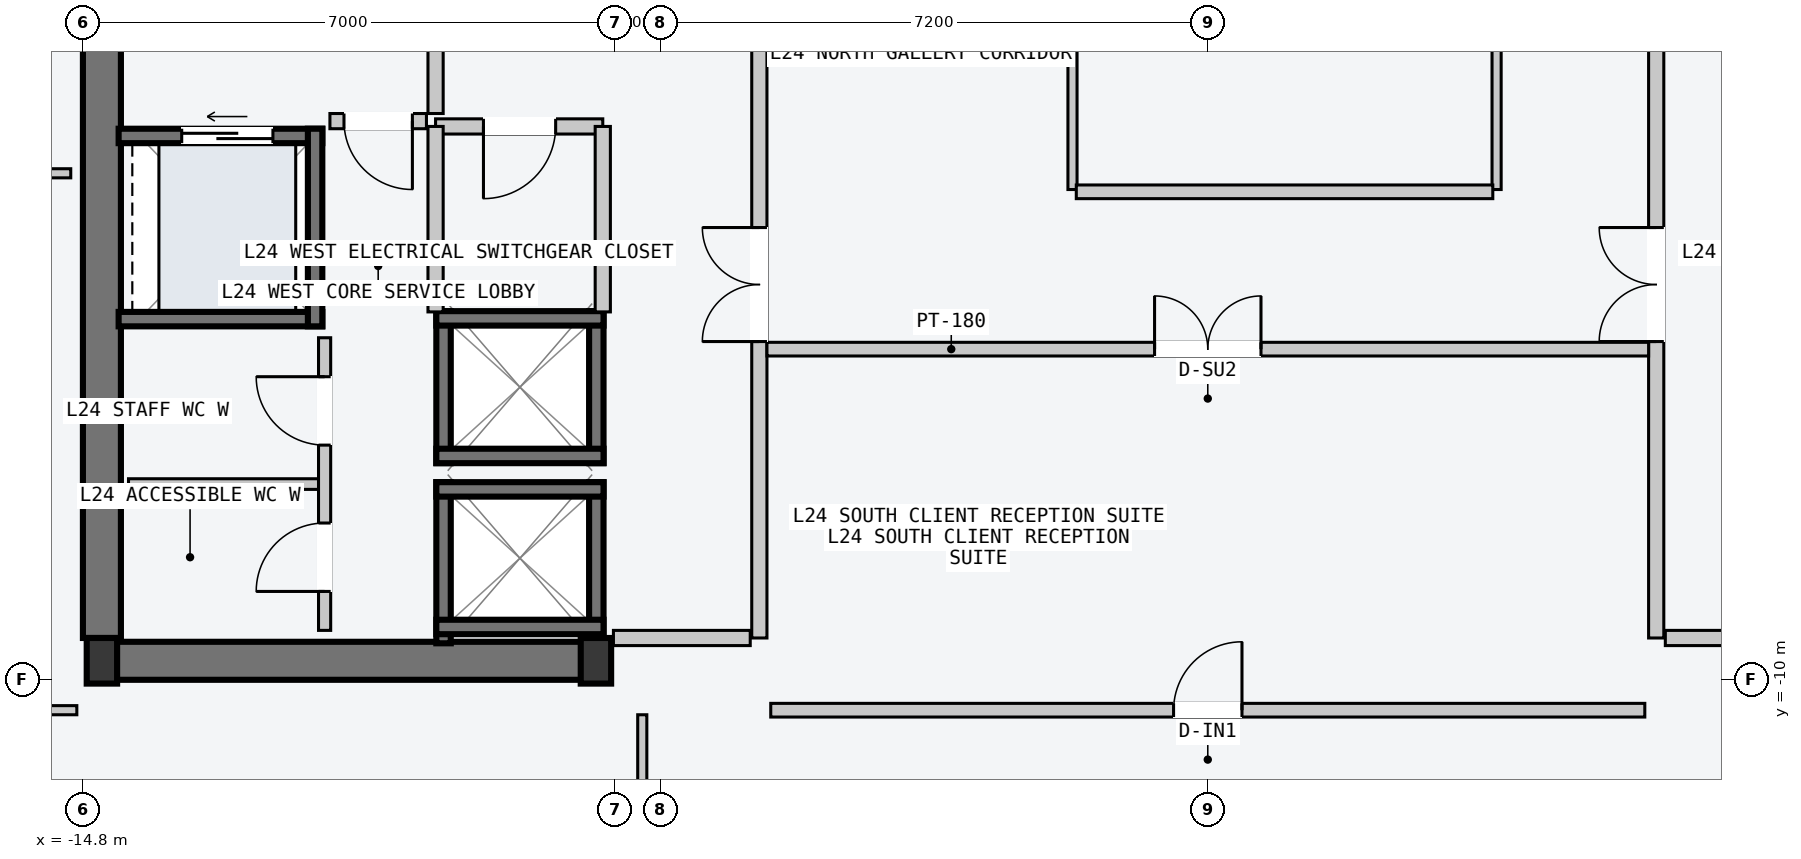
"""IFC4 building model, lengths in metres.
Left out: names, types, materials, properties, quantities, classifications, styles, units other than length and angle.
Written with IfcOpenShell. Run it as: python <this file> out.ifc"""

import sys

from ifc_helpers import new_model, si_unit, direction, frame, frame_2d, origin, origin_2d, place, context, subcontext, project, spatial, rectangle, i_section, extrude, element, fill, save


model = new_model("IFC4")
c1 = context("Model", 3, precision=1e-05, world=origin(), true_north=direction((0.0, 1.0)))
c2 = subcontext(c1, "Body", "Model", "MODEL_VIEW")
j1 = project(units=[si_unit("LENGTHUNIT", "METRE"), si_unit("PLANEANGLEUNIT", "RADIAN")], contexts=[c1])
p1 = place(None, origin())
s1 = spatial("IfcSite", under=j1, at=p1, CompositionType="ELEMENT")
p2 = place(p1, origin())
s2 = spatial("IfcBuilding", under=s1, at=p2, CompositionType="ELEMENT")
p3 = place(p2, frame((0.0, 0.0, 95.4)))
s3 = spatial("IfcBuildingStorey", under=s2, at=p3, CompositionType="ELEMENT", Elevation=95.4)
p4 = place(p3, frame((-14.53, -9.75, -0.2), z_axis=(0.0, 0.0, 1.0), x_axis=(1.0, 0.0, 0.0)))
e1 = element("IfcWall", 1, at=p4, inside=s3, PredefinedType="SHEAR", context=c2, shape_type="SweptSolid", body=[
    extrude(rectangle(XDim=6.46, YDim=0.5, at=frame_2d((3.23, 0.0))), origin(), (0.0, 0.0, 1.0), 3.6),
])
p5 = place(p3, frame((-14.55, -9.45, -0.2), z_axis=(0.0, 0.0, 1.0), x_axis=(0.0, 1.0, 0.0)))
e2 = element("IfcWall", 2, at=p5, inside=s3, PredefinedType="SHEAR", context=c2, shape_type="SweptSolid", body=[
    extrude(rectangle(XDim=9.15, YDim=0.5, at=frame_2d((4.575, 0.0))), origin(), (0.0, 0.0, 1.0), 3.6),
])
for number, where, z_axis, x_axis in (
    (3, (-14.55, -9.75, 0.0), (0.0, 0.0, 1.0), (1.0, 0.0, 0.0)),
    (4, (-8.05, -9.75, 0.0), (0.0, 0.0, 1.0), (1.0, 0.0, 0.0)),
):
    element("IfcColumn", number, at=place(p3, frame(where, z_axis=z_axis, x_axis=x_axis)), inside=s3, PredefinedType="COLUMN", context=c2, shape_type="SweptSolid", body=[
        extrude(i_section(OverallWidth=0.4, OverallDepth=0.6, WebThickness=0.022, FlangeThickness=0.036, at=origin_2d()), origin(), (0.0, 0.0, 1.0), 3.6),
    ])
for number, where, z_axis, x_axis in (
    (5, (-8.045, -9.52, -0.2), (0.0, 0.0, 1.0), (0.0, 1.0, 0.0)),
    (6, (-10.055, -9.52, -0.2), (0.0, 0.0, 1.0), (0.0, 1.0, 0.0)),
):
    element("IfcWall", number, at=place(p3, frame(where, z_axis=z_axis, x_axis=x_axis)), inside=s3, PredefinedType="SOLIDWALL", context=c2, shape_type="SweptSolid", body=[
        extrude(rectangle(XDim=2.12, YDim=0.19, at=frame_2d((1.06, 0.0))), origin(), (0.0, 0.0, 1.0), 3.6),
    ])
for number, where, z_axis, x_axis in (
    (7, (-10.15, -7.495, -0.2), (0.0, 0.0, 1.0), (1.0, 0.0, 0.0)),
    (8, (-10.15, -9.305, -0.2), (0.0, 0.0, 1.0), (1.0, 0.0, 0.0)),
):
    element("IfcWall", number, at=place(p3, frame(where, z_axis=z_axis, x_axis=x_axis)), inside=s3, PredefinedType="SOLIDWALL", context=c2, shape_type="SweptSolid", body=[
        extrude(rectangle(XDim=2.2, YDim=0.19, at=frame_2d((1.1, 0.0))), origin(), (0.0, 0.0, 1.0), 3.6),
    ])
for number, where, z_axis, x_axis in (
    (9, (-8.045, -7.15, -0.2), (0.0, 0.0, 1.0), (0.0, 1.0, 0.0)),
    (10, (-10.055, -7.15, -0.2), (0.0, 0.0, 1.0), (0.0, 1.0, 0.0)),
):
    element("IfcWall", number, at=place(p3, frame(where, z_axis=z_axis, x_axis=x_axis)), inside=s3, PredefinedType="SOLIDWALL", context=c2, shape_type="SweptSolid", body=[
        extrude(rectangle(XDim=2.0, YDim=0.19, at=frame_2d((1.0, 0.0))), origin(), (0.0, 0.0, 1.0), 3.6),
    ])
for number, where, z_axis, x_axis in (
    (11, (-10.15, -5.245, -0.2), (0.0, 0.0, 1.0), (1.0, 0.0, 0.0)),
    (12, (-10.15, -7.055, -0.2), (0.0, 0.0, 1.0), (1.0, 0.0, 0.0)),
):
    element("IfcWall", number, at=place(p3, frame(where, z_axis=z_axis, x_axis=x_axis)), inside=s3, PredefinedType="SOLIDWALL", context=c2, shape_type="SweptSolid", body=[
        extrude(rectangle(XDim=2.2, YDim=0.19, at=frame_2d((1.1, 0.0))), origin(), (0.0, 0.0, 1.0), 3.6),
    ])
p6 = place(p3, frame((-14.33, -2.845, -0.2), z_axis=(0.0, 0.0, 1.0), x_axis=(1.0, 0.0, 0.0)))
e13 = element("IfcWall", 13, at=p6, inside=s3, PredefinedType="SOLIDWALL", context=c2, shape_type="SweptSolid", body=[
    extrude(rectangle(XDim=2.68, YDim=0.19, at=frame_2d((1.34, 0.0))), origin(), (0.0, 0.0, 1.0), 3.6),
])
p7 = place(p6, frame((0.83, 0.0, 0.2)))
e14 = element("IfcOpeningElement", 14, at=p7, cuts=e13, PredefinedType="OPENING", context=c2, shape_type="SweptSolid", body=[
    extrude(rectangle(XDim=1.2, YDim=2.2, at=frame_2d((0.6, 1.1))), frame((0.0, 0.105, 0.0), z_axis=(0.0, -1.0, 0.0), x_axis=(1.0, 0.0, 0.0)), (0.0, 0.0, 1.0), 0.21),
])
p8 = place(p3, frame((-14.33, -5.255, -0.2), z_axis=(0.0, 0.0, 1.0), x_axis=(1.0, 0.0, 0.0)))
e15 = element("IfcWall", 15, at=p8, inside=s3, PredefinedType="SOLIDWALL", context=c2, shape_type="SweptSolid", body=[
    extrude(rectangle(XDim=2.68, YDim=0.19, at=frame_2d((1.34, 0.0))), origin(), (0.0, 0.0, 1.0), 3.6),
])
p9 = place(p3, frame((-11.745, -5.35, -0.2), z_axis=(0.0, 0.0, 1.0), x_axis=(0.0, 1.0, 0.0)))
e16 = element("IfcWall", 16, at=p9, inside=s3, PredefinedType="SOLIDWALL", context=c2, shape_type="SweptSolid", body=[
    extrude(rectangle(XDim=2.6, YDim=0.19, at=frame_2d((1.3, 0.0))), origin(), (0.0, 0.0, 1.0), 3.6),
])
p10 = place(p3, frame((-5.9, -9.45, 0.0), z_axis=(0.0, 0.0, 1.0), x_axis=(0.0, 1.0, 0.0)))
e17 = element("IfcWall", 17, at=p10, inside=s3, PredefinedType="PARTITIONING", context=c2, shape_type="SweptSolid", body=[
    extrude(rectangle(XDim=10.5, YDim=0.2, at=frame_2d((5.25, 0.0))), origin(), (0.0, 0.0, 1.0), 3.4),
])
p11 = place(p10, frame((3.9, 0.0, 0.0)))
e18 = element("IfcOpeningElement", 18, at=p11, cuts=e17, PredefinedType="OPENING", context=c2, shape_type="SweptSolid", body=[
    extrude(rectangle(XDim=1.5, YDim=2.2, at=frame_2d((0.75, 1.1))), frame((0.0, 0.11, 0.0), z_axis=(0.0, -1.0, 0.0), x_axis=(1.0, 0.0, 0.0)), (0.0, 0.0, 1.0), 0.22),
])
p12 = place(p3, frame((-6.02, -9.45, 0.0), z_axis=(0.0, 0.0, 1.0), x_axis=(-1.0, 0.0, 0.0)))
e19 = element("IfcWall", 19, at=p12, inside=s3, PredefinedType="PARTITIONING", context=c2, shape_type="SweptSolid", body=[
    extrude(rectangle(XDim=1.8, YDim=0.2, at=frame_2d((0.9, 0.0))), origin(), (0.0, 0.0, 1.0), 3.4),
])
p13 = place(p3, frame((-10.16, -2.55, 0.0), z_axis=(0.0, 0.0, 1.0), x_axis=(0.0, 1.0, 0.0)))
e20 = element("IfcWall", 20, at=p13, inside=s3, PredefinedType="PARTITIONING", context=c2, shape_type="SweptSolid", body=[
    extrude(rectangle(XDim=3.8, YDim=0.2, at=frame_2d((1.9, 0.0))), origin(), (0.0, 0.0, 1.0), 3.4),
])
p14 = place(p13, frame((1.3, 0.0, 0.0)))
e21 = element("IfcOpeningElement", 21, at=p14, cuts=e20, PredefinedType="OPENING", context=c2, shape_type="SweptSolid", body=[
    extrude(rectangle(XDim=1.1, YDim=2.15, at=frame_2d((0.55, 1.075))), frame((0.0, 0.11, 0.0), z_axis=(0.0, -1.0, 0.0), x_axis=(1.0, 0.0, 0.0)), (0.0, 0.0, 1.0), 0.22),
])
p15 = place(p3, frame((-10.28, -2.65, 0.0), z_axis=(0.0, 0.0, 1.0), x_axis=(-1.0, 0.0, 0.0)))
e22 = element("IfcWall", 22, at=p15, inside=s3, PredefinedType="PARTITIONING", context=c2, shape_type="SweptSolid", body=[
    extrude(rectangle(XDim=1.27, YDim=0.2, at=frame_2d((0.635, 0.0))), origin(), (0.0, 0.0, 1.0), 3.4),
])
p16 = place(p15, frame((0.185, 0.0, 0.0)))
e23 = element("IfcOpeningElement", 23, at=p16, cuts=e22, PredefinedType="OPENING", context=c2, shape_type="SweptSolid", body=[
    extrude(rectangle(XDim=0.9, YDim=2.15, at=frame_2d((0.45, 1.075))), frame((0.0, 0.11, 0.0), z_axis=(0.0, -1.0, 0.0), x_axis=(1.0, 0.0, 0.0)), (0.0, 0.0, 1.0), 0.22),
])
p17 = place(p3, frame((-7.96, -2.72, 0.0), z_axis=(0.0, 0.0, 1.0), x_axis=(-1.0, 0.0, 0.0)))
e24 = element("IfcWall", 24, at=p17, inside=s3, PredefinedType="PARTITIONING", context=c2, shape_type="SweptSolid", body=[
    extrude(rectangle(XDim=2.2, YDim=0.2, at=frame_2d((1.1, 0.0))), origin(), (0.0, 0.0, 1.0), 3.4),
])
p18 = place(p17, frame((0.62, 0.0, 0.0)))
e25 = element("IfcOpeningElement", 25, at=p18, cuts=e24, PredefinedType="OPENING", context=c2, shape_type="SweptSolid", body=[
    extrude(rectangle(XDim=0.95, YDim=2.1, at=frame_2d((0.475, 1.05))), frame((0.0, 0.11, 0.0), z_axis=(0.0, -1.0, 0.0), x_axis=(1.0, 0.0, 0.0)), (0.0, 0.0, 1.0), 0.22),
])
for number, where, z_axis, x_axis in (
    (26, (-7.96, -5.16, 0.0), (0.0, 0.0, 1.0), (0.0, 1.0, 0.0)),
    (27, (-10.16, -5.16, 0.0), (0.0, 0.0, 1.0), (0.0, 1.0, 0.0)),
):
    element("IfcWall", number, at=place(p3, frame(where, z_axis=z_axis, x_axis=x_axis)), inside=s3, PredefinedType="PARTITIONING", context=c2, shape_type="SweptSolid", body=[
        extrude(rectangle(XDim=2.44, YDim=0.2, at=frame_2d((1.22, 0.0))), origin(), (0.0, 0.0, 1.0), 3.4),
    ])
p19 = place(p3, frame((-11.7, -7.425, 0.0), z_axis=(0.0, 0.0, 1.0), x_axis=(-1.0, 0.0, 0.0)))
e28 = element("IfcWall", 28, at=p19, inside=s3, PredefinedType="PARTITIONING", context=c2, shape_type="SweptSolid", body=[
    extrude(rectangle(XDim=2.5, YDim=0.14, at=frame_2d((1.25, 0.0))), origin(), (0.0, 0.0, 1.0), 3.4),
])
p20 = place(p3, frame((-11.62, -9.35, 0.0), z_axis=(0.0, 0.0, 1.0), x_axis=(0.0, 1.0, 0.0)))
e29 = element("IfcWall", 29, at=p20, inside=s3, PredefinedType="PARTITIONING", context=c2, shape_type="SweptSolid", body=[
    extrude(rectangle(XDim=3.85, YDim=0.16, at=frame_2d((1.925, 0.0))), origin(), (0.0, 0.0, 1.0), 3.4),
])
p21 = place(p20, frame((0.512, 0.0, 0.0)))
e30 = element("IfcOpeningElement", 30, at=p21, cuts=e29, PredefinedType="OPENING", context=c2, shape_type="SweptSolid", body=[
    extrude(rectangle(XDim=0.9, YDim=2.15, at=frame_2d((0.45, 1.075))), frame((0.0, 0.09, 0.0), z_axis=(0.0, -1.0, 0.0), x_axis=(1.0, 0.0, 0.0)), (0.0, 0.0, 1.0), 0.18),
])
p22 = place(p20, frame((2.438, 0.0, 0.0)))
e31 = element("IfcOpeningElement", 31, at=p22, cuts=e29, PredefinedType="OPENING", context=c2, shape_type="SweptSolid", body=[
    extrude(rectangle(XDim=0.9, YDim=2.15, at=frame_2d((0.45, 1.075))), frame((0.0, 0.09, 0.0), z_axis=(0.0, -1.0, 0.0), x_axis=(1.0, 0.0, 0.0)), (0.0, 0.0, 1.0), 0.18),
])
p23 = place(p3, frame((5.9, -9.45, 0.0), z_axis=(0.0, 0.0, 1.0), x_axis=(0.0, 1.0, 0.0)))
e32 = element("IfcWall", 32, at=p23, inside=s3, PredefinedType="PARTITIONING", context=c2, shape_type="SweptSolid", body=[
    extrude(rectangle(XDim=18.9, YDim=0.2, at=frame_2d((9.45, 0.0))), origin(), (0.0, 0.0, 1.0), 3.4),
])
p24 = place(p23, frame((3.9, 0.0, 0.0)))
e33 = element("IfcOpeningElement", 33, at=p24, cuts=e32, PredefinedType="OPENING", context=c2, shape_type="SweptSolid", body=[
    extrude(rectangle(XDim=1.5, YDim=2.2, at=frame_2d((0.75, 1.1))), frame((0.0, 0.11, 0.0), z_axis=(0.0, -1.0, 0.0), x_axis=(1.0, 0.0, 0.0)), (0.0, 0.0, 1.0), 0.22),
])
p25 = place(p3, frame((6.02, -9.45, 0.0), z_axis=(0.0, 0.0, 1.0), x_axis=(1.0, 0.0, 0.0)))
e34 = element("IfcWall", 34, at=p25, inside=s3, PredefinedType="PARTITIONING", context=c2, shape_type="SweptSolid", body=[
    extrude(rectangle(XDim=1.8, YDim=0.2, at=frame_2d((0.9, 0.0))), origin(), (0.0, 0.0, 1.0), 3.4),
])
for number, where, z_axis, x_axis in (
    (35, (-1.78, -3.55, 0.0), (0.0, 0.0, 1.0), (0.0, 1.0, 0.0)),
    (36, (3.8, -3.55, 0.0), (0.0, 0.0, 1.0), (0.0, 1.0, 0.0)),
):
    element("IfcWall", number, at=place(p3, frame(where, z_axis=z_axis, x_axis=x_axis)), inside=s3, PredefinedType="PARTITIONING", context=c2, shape_type="SweptSolid", body=[
        extrude(rectangle(XDim=13.77, YDim=0.12, at=frame_2d((6.885, 0.0))), origin(), (0.0, 0.0, 1.0), 3.4),
    ])
p26 = place(p3, frame((-1.73, -3.58, 0.0), z_axis=(0.0, 0.0, 1.0), x_axis=(1.0, 0.0, 0.0)))
e37 = element("IfcWall", 37, at=p26, inside=s3, PredefinedType="PARTITIONING", context=c2, shape_type="SweptSolid", body=[
    extrude(rectangle(XDim=5.48, YDim=0.18, at=frame_2d((2.74, 0.0))), origin(), (0.0, 0.0, 1.0), 3.4),
])
p27 = place(p3, frame((-5.8, -5.65, 0.0), z_axis=(0.0, 0.0, 1.0), x_axis=(1.0, 0.0, 0.0)))
e38 = element("IfcWall", 38, at=p27, inside=s3, PredefinedType="PARTITIONING", context=c2, shape_type="SweptSolid", body=[
    extrude(rectangle(XDim=11.6, YDim=0.18, at=frame_2d((5.8, 0.0))), origin(), (0.0, 0.0, 1.0), 3.4),
])
p28 = place(p27, frame((5.1, 0.0, 0.0)))
e39 = element("IfcOpeningElement", 39, at=p28, cuts=e38, PredefinedType="OPENING", context=c2, shape_type="SweptSolid", body=[
    extrude(rectangle(XDim=1.4, YDim=2.2, at=frame_2d((0.7, 1.1))), frame((0.0, 0.1, 0.0), z_axis=(0.0, -1.0, 0.0), x_axis=(1.0, 0.0, 0.0)), (0.0, 0.0, 1.0), 0.2),
])
p29 = place(p3, frame((-7.44, -19.56, 0.0), z_axis=(0.0, 0.0, 1.0), x_axis=(0.0, 1.0, 0.0)))
e40 = element("IfcWall", 40, at=p29, inside=s3, PredefinedType="PARTITIONING", context=c2, shape_type="SweptSolid", body=[
    extrude(rectangle(XDim=9.1, YDim=0.12, at=frame_2d((4.55, 0.0))), origin(), (0.0, 0.0, 1.0), 3.4),
])
p30 = place(p29, frame((1.34, 0.0, 0.0)))
e41 = element("IfcOpeningElement", 41, at=p30, cuts=e40, PredefinedType="OPENING", context=c2, shape_type="SweptSolid", body=[
    extrude(rectangle(XDim=0.96, YDim=2.18, at=frame_2d((0.48, 1.09))), frame((0.0, 0.07, 0.0), z_axis=(0.0, -1.0, 0.0), x_axis=(1.0, 0.0, 0.0)), (0.0, 0.0, 1.0), 0.14),
])
p31 = place(p3, frame((-5.75, -10.4, 0.0), z_axis=(0.0, 0.0, 1.0), x_axis=(1.0, 0.0, 0.0)))
e42 = element("IfcWall", 42, at=p31, inside=s3, PredefinedType="PARTITIONING", context=c2, shape_type="SweptSolid", body=[
    extrude(rectangle(XDim=11.5, YDim=0.18, at=frame_2d((5.75, 0.0))), origin(), (0.0, 0.0, 1.0), 3.4),
])
p32 = place(p31, frame((5.3, 0.0, 0.0)))
e43 = element("IfcOpeningElement", 43, at=p32, cuts=e42, PredefinedType="OPENING", context=c2, shape_type="SweptSolid", body=[
    extrude(rectangle(XDim=0.9, YDim=2.15, at=frame_2d((0.45, 1.075))), frame((0.0, 0.1, 0.0), z_axis=(0.0, -1.0, 0.0), x_axis=(1.0, 0.0, 0.0)), (0.0, 0.0, 1.0), 0.2),
])
p33 = place(p3, frame((-22.56, -10.4, 0.0), z_axis=(0.0, 0.0, 1.0), x_axis=(1.0, 0.0, 0.0)))
e44 = element("IfcWall", 44, at=p33, inside=s3, PredefinedType="PARTITIONING", context=c2, shape_type="SweptSolid", body=[
    extrude(rectangle(XDim=7.68, YDim=0.12, at=frame_2d((3.84, 0.0))), origin(), (0.0, 0.0, 1.0), 3.4),
])
p34 = place(p33, frame((3.36, 0.0, 0.0)))
e45 = element("IfcOpeningElement", 45, at=p34, cuts=e44, PredefinedType="OPENING", context=c2, shape_type="SweptSolid", body=[
    extrude(rectangle(XDim=0.96, YDim=2.18, at=frame_2d((0.48, 1.09))), frame((0.0, 0.07, 0.0), z_axis=(0.0, -1.0, 0.0), x_axis=(1.0, 0.0, 0.0)), (0.0, 0.0, 1.0), 0.14),
])
p35 = place(p3, frame((-22.56, -3.336, 0.0), z_axis=(0.0, 0.0, 1.0), x_axis=(1.0, 0.0, 0.0)))
e46 = element("IfcWall", 46, at=p35, inside=s3, PredefinedType="PARTITIONING", context=c2, shape_type="SweptSolid", body=[
    extrude(rectangle(XDim=7.6, YDim=0.12, at=frame_2d((3.8, 0.0))), origin(), (0.0, 0.0, 1.0), 3.0),
])
p36 = place(p35, frame((0.9, 0.0, 0.0)))
e47 = element("IfcOpeningElement", 47, at=p36, cuts=e46, PredefinedType="OPENING", context=c2, shape_type="SweptSolid", body=[
    extrude(rectangle(XDim=0.96, YDim=2.18, at=frame_2d((0.48, 1.09))), frame((0.0, 0.07, 0.0), z_axis=(0.0, -1.0, 0.0), x_axis=(1.0, 0.0, 0.0)), (0.0, 0.0, 1.0), 0.14),
])
p37 = place(p7, origin())
e48 = element("IfcDoor", 48, at=p37, inside=s3, OperationType="SLIDING_TO_LEFT", PredefinedType="DOOR", context=c2, shape_type="SweptSolid", body=[
    extrude(rectangle(XDim=1.2, YDim=2.2, at=frame_2d((0.6, 1.1))), frame((0.0, 0.025, 0.0), z_axis=(0.0, -1.0, 0.0), x_axis=(1.0, 0.0, 0.0)), (0.0, 0.0, 1.0), 0.05),
])
fill(e14, e48)
p38 = place(p11, origin())
e49 = element("IfcDoor", 49, at=p38, inside=s3, OperationType="DOUBLE_DOOR_SINGLE_SWING", PredefinedType="DOOR", context=c2, shape_type="SweptSolid", body=[
    extrude(rectangle(XDim=1.5, YDim=2.2, at=frame_2d((0.75, 1.1))), frame((0.0, 0.025, 0.0), z_axis=(0.0, -1.0, 0.0), x_axis=(1.0, 0.0, 0.0)), (0.0, 0.0, 1.0), 0.05),
])
fill(e18, e49)
p39 = place(p16, origin())
e50 = element("IfcDoor", 50, at=p39, inside=s3, OperationType="SINGLE_SWING_LEFT", PredefinedType="DOOR", context=c2, shape_type="SweptSolid", body=[
    extrude(rectangle(XDim=0.9, YDim=2.15, at=frame_2d((0.45, 1.075))), frame((0.0, 0.025, 0.0), z_axis=(0.0, -1.0, 0.0), x_axis=(1.0, 0.0, 0.0)), (0.0, 0.0, 1.0), 0.05),
])
fill(e23, e50)
p40 = place(p18, origin())
e51 = element("IfcDoor", 51, at=p40, inside=s3, OperationType="SINGLE_SWING_RIGHT", PredefinedType="DOOR", context=c2, shape_type="SweptSolid", body=[
    extrude(rectangle(XDim=0.95, YDim=2.1, at=frame_2d((0.475, 1.05))), frame((0.0, 0.025, 0.0), z_axis=(0.0, -1.0, 0.0), x_axis=(1.0, 0.0, 0.0)), (0.0, 0.0, 1.0), 0.05),
])
fill(e25, e51)
p41 = place(p21, origin())
e52 = element("IfcDoor", 52, at=p41, inside=s3, OperationType="SINGLE_SWING_LEFT", PredefinedType="DOOR", context=c2, shape_type="SweptSolid", body=[
    extrude(rectangle(XDim=0.9, YDim=2.15, at=frame_2d((0.45, 1.075))), frame((0.0, 0.025, 0.0), z_axis=(0.0, -1.0, 0.0), x_axis=(1.0, 0.0, 0.0)), (0.0, 0.0, 1.0), 0.05),
])
fill(e30, e52)
p42 = place(p22, origin())
e53 = element("IfcDoor", 53, at=p42, inside=s3, OperationType="SINGLE_SWING_RIGHT", PredefinedType="DOOR", context=c2, shape_type="SweptSolid", body=[
    extrude(rectangle(XDim=0.9, YDim=2.15, at=frame_2d((0.45, 1.075))), frame((0.0, 0.025, 0.0), z_axis=(0.0, -1.0, 0.0), x_axis=(1.0, 0.0, 0.0)), (0.0, 0.0, 1.0), 0.05),
])
fill(e31, e53)
p43 = place(p24, origin())
e54 = element("IfcDoor", 54, at=p43, inside=s3, OperationType="DOUBLE_DOOR_SINGLE_SWING", PredefinedType="DOOR", context=c2, shape_type="SweptSolid", body=[
    extrude(rectangle(XDim=1.5, YDim=2.2, at=frame_2d((0.75, 1.1))), frame((0.0, 0.025, 0.0), z_axis=(0.0, -1.0, 0.0), x_axis=(1.0, 0.0, 0.0)), (0.0, 0.0, 1.0), 0.05),
])
fill(e33, e54)
p44 = place(p28, origin())
e55 = element("IfcDoor", 55, at=p44, inside=s3, OperationType="DOUBLE_DOOR_SINGLE_SWING", PredefinedType="DOOR", context=c2, shape_type="SweptSolid", body=[
    extrude(rectangle(XDim=1.4, YDim=2.2, at=frame_2d((0.7, 1.1))), frame((0.0, 0.025, 0.0), z_axis=(0.0, -1.0, 0.0), x_axis=(1.0, 0.0, 0.0)), (0.0, 0.0, 1.0), 0.05),
])
fill(e39, e55)
p45 = place(p32, origin())
e56 = element("IfcDoor", 56, at=p45, inside=s3, OperationType="SINGLE_SWING_RIGHT", PredefinedType="DOOR", context=c2, shape_type="SweptSolid", body=[
    extrude(rectangle(XDim=0.9, YDim=2.15, at=frame_2d((0.45, 1.075))), frame((0.0, 0.025, 0.0), z_axis=(0.0, -1.0, 0.0), x_axis=(1.0, 0.0, 0.0)), (0.0, 0.0, 1.0), 0.05),
])
fill(e43, e56)
save(model, sys.argv[1])
